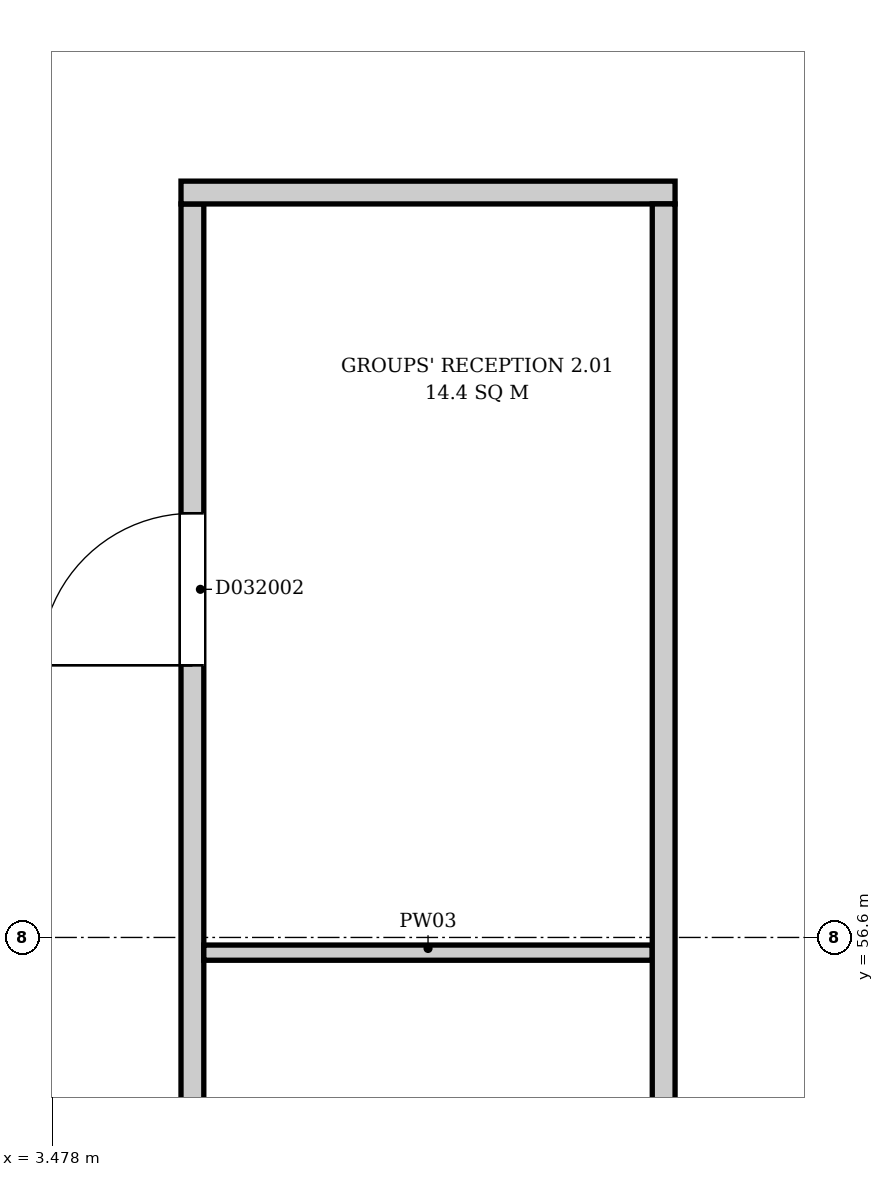
"""IFC4 building model, lengths in metres.
Left out: names, types, materials, properties, quantities, classifications, styles, units other than length and angle.
Written with IfcOpenShell. Run it as: python <this file> out.ifc"""

import sys

from ifc_helpers import new_model, si_unit, direction, frame, frame_2d, origin, place, context, subcontext, project, spatial, rectangle, extrude, element, fill, save


model = new_model("IFC4")
c1 = context("Model", 3, precision=1e-05, world=origin(), true_north=direction((0.0, 1.0)))
c2 = subcontext(c1, "Body", "Model", "MODEL_VIEW")
j1 = project(units=[si_unit("LENGTHUNIT", "METRE"), si_unit("PLANEANGLEUNIT", "RADIAN")], contexts=[c1])
p1 = place(None, origin())
s1 = spatial("IfcSite", under=j1, at=p1, CompositionType="ELEMENT")
p2 = place(p1, origin())
s2 = spatial("IfcBuilding", under=s1, at=p2, CompositionType="ELEMENT")
p3 = place(p2, frame((0.0, 0.0, 14.2)))
s3 = spatial("IfcBuildingStorey", under=s2, at=p3, CompositionType="ELEMENT", Elevation=14.2)
p4 = place(p3, frame((4.4, 49.075, 0.0), z_axis=(0.0, 0.0, 1.0), x_axis=(0.0, 1.0, 0.0)))
e1 = element("IfcWall", 1, at=p4, inside=s3, PredefinedType="PARTITIONING", context=c2, shape_type="SweptSolid", body=[
    extrude(rectangle(XDim=12.35, YDim=0.15, at=frame_2d((6.175, 0.0))), origin(), (0.0, 0.0, 1.0), 7.15),
])
p5 = place(p4, frame((3.285, 0.0, 0.0)))
e2 = element("IfcOpeningElement", 2, at=p5, cuts=e1, PredefinedType="OPENING", context=c2, shape_type="SweptSolid", body=[
    extrude(rectangle(XDim=1.0, YDim=2.1, at=frame_2d((0.5, 1.05))), frame((0.0, 0.085, 0.0), z_axis=(0.0, -1.0, 0.0), x_axis=(1.0, 0.0, 0.0)), (0.0, 0.0, 1.0), 0.17),
])
p6 = place(p4, frame((9.315, 0.0, 0.0)))
e3 = element("IfcOpeningElement", 3, at=p6, cuts=e1, PredefinedType="OPENING", context=c2, shape_type="SweptSolid", body=[
    extrude(rectangle(XDim=1.0, YDim=2.1, at=frame_2d((0.5, 1.05))), frame((0.0, 0.085, 0.0), z_axis=(0.0, -1.0, 0.0), x_axis=(1.0, 0.0, 0.0)), (0.0, 0.0, 1.0), 0.17),
])
p7 = place(p3, frame((4.325, 61.5, 0.0), z_axis=(0.0, 0.0, 1.0), x_axis=(1.0, 0.0, 0.0)))
e4 = element("IfcWall", 4, at=p7, inside=s3, PredefinedType="PARTITIONING", context=c2, shape_type="SweptSolid", body=[
    extrude(rectangle(XDim=3.25, YDim=0.15, at=frame_2d((1.625, 0.0))), origin(), (0.0, 0.0, 1.0), 7.15),
])
p8 = place(p3, frame((4.475, 56.5, 0.0), z_axis=(0.0, 0.0, 1.0), x_axis=(1.0, 0.0, 0.0)))
e5 = element("IfcWall", 5, at=p8, inside=s3, PredefinedType="PARTITIONING", context=c2, shape_type="SweptSolid", body=[
    extrude(rectangle(XDim=2.95, YDim=0.1, at=frame_2d((1.475, 0.0))), origin(), (0.0, 0.0, 1.0), 6.75),
])
p9 = place(p3, frame((7.5, 49.075, 0.0), z_axis=(0.0, 0.0, 1.0), x_axis=(0.0, 1.0, 0.0)))
e6 = element("IfcWall", 6, at=p9, inside=s3, PredefinedType="PARTITIONING", context=c2, shape_type="SweptSolid", body=[
    extrude(rectangle(XDim=12.35, YDim=0.15, at=frame_2d((6.175, 0.0))), origin(), (0.0, 0.0, 1.0), 7.15),
])
p10 = place(p6, origin())
e7 = element("IfcDoor", 7, at=p10, inside=s3, OperationType="SINGLE_SWING_LEFT", PredefinedType="DOOR", context=c2, shape_type="SweptSolid", body=[
    extrude(rectangle(XDim=1.0, YDim=2.1, at=frame_2d((0.5, 1.05))), frame((0.0, 0.025, 0.0), z_axis=(0.0, -1.0, 0.0), x_axis=(1.0, 0.0, 0.0)), (0.0, 0.0, 1.0), 0.05),
])
fill(e3, e7)
save(model, sys.argv[1])
